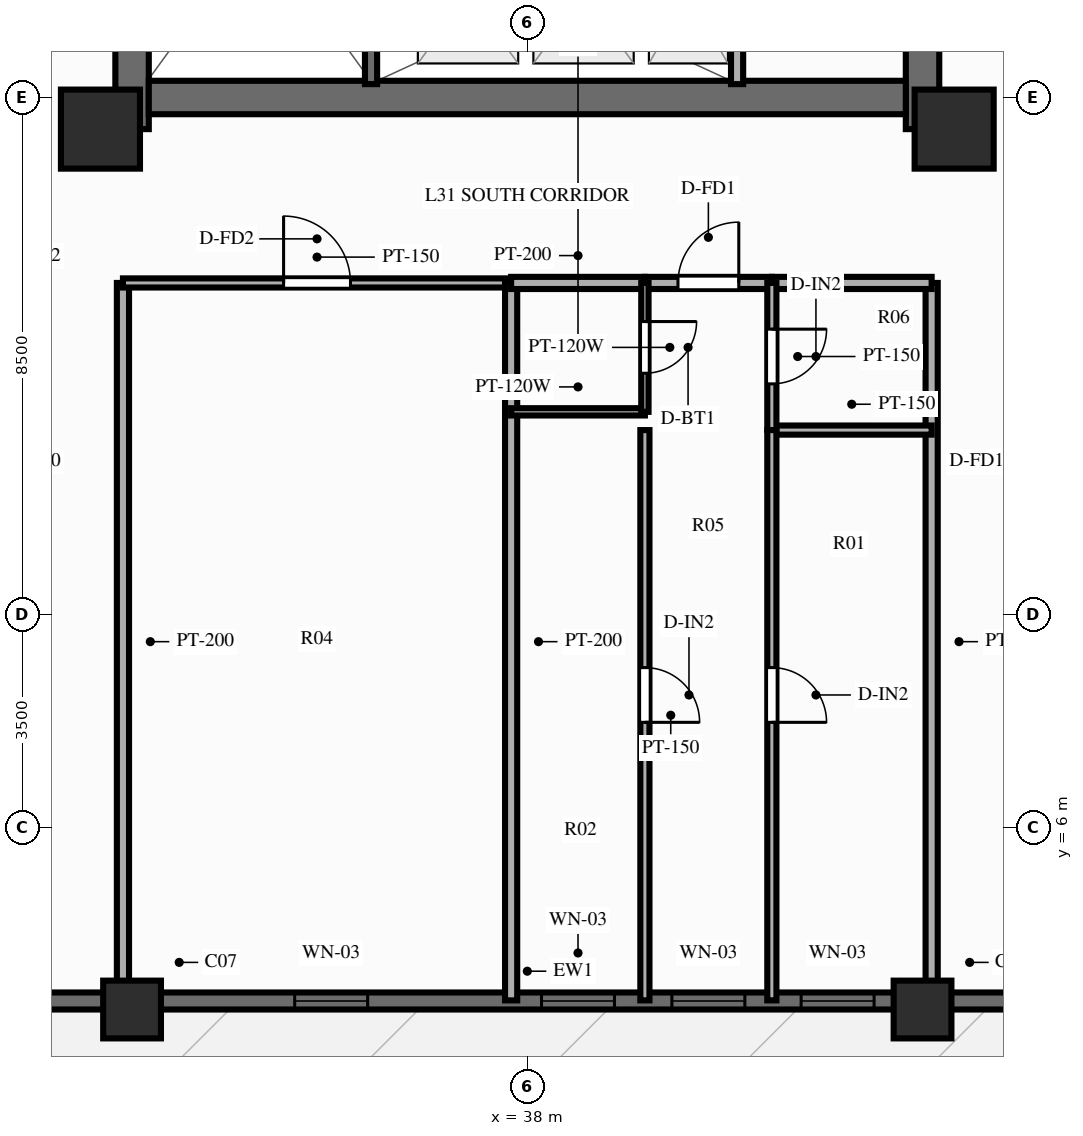
"""IFC4 building model, lengths in metres.
Left out: names, types, materials, properties, quantities, classifications, styles, units other than length and angle.
Written with IfcOpenShell. Run it as: python <this file> out.ifc"""

import sys

from ifc_helpers import new_model, si_unit, direction, frame, frame_2d, origin, origin_2d, place, context, subcontext, project, spatial, rectangle, extrude, source, transform, mapped, element, fill, save


model = new_model("IFC4")
c1 = context("Model", 3, precision=1e-05, world=origin(), true_north=direction((0.0, 1.0)))
c2 = subcontext(c1, "Body", "Model", "MODEL_VIEW")
j1 = project(units=[si_unit("LENGTHUNIT", "METRE"), si_unit("PLANEANGLEUNIT", "RADIAN")], contexts=[c1])
p1 = place(None, origin())
s1 = spatial("IfcSite", under=j1, at=p1, CompositionType="ELEMENT")
p2 = place(p1, origin())
s2 = spatial("IfcBuilding", under=s1, at=p2, CompositionType="ELEMENT")
p3 = place(p2, frame((0.0, 0.0, 98.85)))
s3 = spatial("IfcBuildingStorey", under=s2, at=p3, CompositionType="ELEMENT", Elevation=98.85)
p4 = place(p3, frame((31.5, 17.48, 0.0), z_axis=(0.0, 0.0, 1.0), x_axis=(0.0, 1.0, 0.0)))
e1 = element("IfcWall", 1, at=p4, inside=s3, PredefinedType="SHEAR", context=c2, shape_type="SweptSolid", body=[
    extrude(rectangle(XDim=19.04, YDim=0.55, at=frame_2d((9.52, 0.0))), origin(), (0.0, 0.0, 1.0), 3.0),
])
p5 = place(p4, frame((6.32, 0.0, 0.0)))
e2 = element("IfcOpeningElement", 2, at=p5, cuts=e1, PredefinedType="OPENING", context=c2, shape_type="SweptSolid", body=[
    extrude(rectangle(XDim=1.1, YDim=2.15, at=frame_2d((0.55, 1.075))), frame((0.0, 0.287, 0.0), z_axis=(0.0, -1.0, 0.0), x_axis=(1.0, 0.0, 0.0)), (0.0, 0.0, 1.0), 0.574),
])
p6 = place(p3, frame((44.5, 17.48, 0.0), z_axis=(0.0, 0.0, 1.0), x_axis=(0.0, 1.0, 0.0)))
e3 = element("IfcWall", 3, at=p6, inside=s3, PredefinedType="SHEAR", context=c2, shape_type="SweptSolid", body=[
    extrude(rectangle(XDim=19.04, YDim=0.55, at=frame_2d((9.52, 0.0))), origin(), (0.0, 0.0, 1.0), 3.0),
])
p7 = place(p6, frame((12.67, 0.0, 0.0), z_axis=(0.0, 0.0, 1.0), x_axis=(-1.0, 0.0, 0.0)))
e4 = element("IfcOpeningElement", 4, at=p7, cuts=e3, PredefinedType="OPENING", context=c2, shape_type="SweptSolid", body=[
    extrude(rectangle(XDim=1.1, YDim=2.15, at=frame_2d((0.55, 1.075))), frame((0.0, 0.287, 0.0), z_axis=(0.0, -1.0, 0.0), x_axis=(1.0, 0.0, 0.0)), (0.0, 0.0, 1.0), 0.574),
])
p8 = place(p3, frame((31.775, 18.0, 0.0), z_axis=(0.0, 0.0, 1.0), x_axis=(1.0, 0.0, 0.0)))
e5 = element("IfcWall", 5, at=p8, inside=s3, PredefinedType="SHEAR", context=c2, shape_type="SweptSolid", body=[
    extrude(rectangle(XDim=12.45, YDim=0.55, at=frame_2d((6.225, 0.0))), origin(), (0.0, 0.0, 1.0), 3.0),
])
m1 = source(origin(), c2, "Body", "SweptSolid", [
    extrude(rectangle(XDim=1.3, YDim=1.3, at=origin_2d()), origin(), (0.0, 0.0, 1.0), 3.0),
])
for number, where, z_axis, x_axis in (
    (6, (30.98, 17.48, 0.0), (0.0, 0.0, 1.0), (1.0, 0.0, 0.0)),
    (7, (45.02, 17.48, 0.0), (0.0, 0.0, 1.0), (1.0, 0.0, 0.0)),
):
    element("IfcColumn", number, at=place(p3, frame(where, z_axis=z_axis, x_axis=x_axis)), inside=s3, PredefinedType="COLUMN", context=c2, shape_type="MappedRepresentation", body=[
        mapped(m1, transform((0.0, 0.0, 0.0), scale=1.0)),
    ])
m2 = source(origin(), c2, "Body", "SweptSolid", [
    extrude(rectangle(XDim=0.95, YDim=0.95, at=origin_2d()), origin(), (0.0, 0.0, 1.0), 3.0),
])
for number, where, z_axis, x_axis in (
    (8, (31.5, 3.0, 0.0), (0.0, 0.0, 1.0), (1.0, 0.0, 0.0)),
    (9, (44.5, 3.0, 0.0), (0.0, 0.0, 1.0), (1.0, 0.0, 0.0)),
):
    element("IfcColumn", number, at=place(p3, frame(where, z_axis=z_axis, x_axis=x_axis)), inside=s3, PredefinedType="COLUMN", context=c2, shape_type="MappedRepresentation", body=[
        mapped(m2, transform((0.0, 0.0, 0.0), scale=1.0)),
    ])
p9 = place(p3, frame((16.2, 3.14, 0.0), z_axis=(0.0, 0.0, 1.0), x_axis=(1.0, 0.0, 0.0)))
e10 = element("IfcWall", 10, at=p9, inside=s3, PredefinedType="SOLIDWALL", context=c2, shape_type="SweptSolid", body=[
    extrude(rectangle(XDim=43.6, YDim=0.28, at=frame_2d((21.8, 0.0))), origin(), (0.0, 0.0, 1.0), 2.28),
])
p10 = place(p9, frame((8.2, 0.0, 0.0), z_axis=(0.0, 0.0, 1.0), x_axis=(-1.0, 0.0, 0.0)))
e11 = element("IfcOpeningElement", 11, at=p10, cuts=e10, PredefinedType="OPENING", context=c2, shape_type="SweptSolid", body=[
    extrude(rectangle(XDim=1.1, YDim=2.15, at=frame_2d((0.55, 1.075))), frame((0.0, 0.152, 0.0), z_axis=(0.0, -1.0, 0.0), x_axis=(1.0, 0.0, 0.0)), (0.0, 0.0, 1.0), 0.304),
])
p11 = place(p9, frame((17.975, 0.0, 0.25)))
e12 = element("IfcOpeningElement", 12, at=p11, cuts=e10, PredefinedType="OPENING", context=c2, shape_type="SweptSolid", body=[
    extrude(rectangle(XDim=1.2, YDim=1.5, at=frame_2d((0.6, 0.75))), frame((0.0, 0.152, 0.0), z_axis=(0.0, -1.0, 0.0), x_axis=(1.0, 0.0, 0.0)), (0.0, 0.0, 1.0), 0.304),
])
p12 = place(p9, frame((22.034, 0.0, 0.25)))
e13 = element("IfcOpeningElement", 13, at=p12, cuts=e10, PredefinedType="OPENING", context=c2, shape_type="SweptSolid", body=[
    extrude(rectangle(XDim=1.2, YDim=1.5, at=frame_2d((0.6, 0.75))), frame((0.0, 0.152, 0.0), z_axis=(0.0, -1.0, 0.0), x_axis=(1.0, 0.0, 0.0)), (0.0, 0.0, 1.0), 0.304),
])
p13 = place(p9, frame((24.178, 0.0, 0.25)))
e14 = element("IfcOpeningElement", 14, at=p13, cuts=e10, PredefinedType="OPENING", context=c2, shape_type="SweptSolid", body=[
    extrude(rectangle(XDim=1.2, YDim=1.5, at=frame_2d((0.6, 0.75))), frame((0.0, 0.152, 0.0), z_axis=(0.0, -1.0, 0.0), x_axis=(1.0, 0.0, 0.0)), (0.0, 0.0, 1.0), 0.304),
])
p14 = place(p9, frame((26.303, 0.0, 0.25)))
e15 = element("IfcOpeningElement", 15, at=p14, cuts=e10, PredefinedType="OPENING", context=c2, shape_type="SweptSolid", body=[
    extrude(rectangle(XDim=1.2, YDim=1.5, at=frame_2d((0.6, 0.75))), frame((0.0, 0.152, 0.0), z_axis=(0.0, -1.0, 0.0), x_axis=(1.0, 0.0, 0.0)), (0.0, 0.0, 1.0), 0.304),
])
p15 = place(p9, frame((35.35, 0.0, 0.25)))
e16 = element("IfcOpeningElement", 16, at=p15, cuts=e10, PredefinedType="OPENING", context=c2, shape_type="SweptSolid", body=[
    extrude(rectangle(XDim=1.2, YDim=1.5, at=frame_2d((0.6, 0.75))), frame((0.0, 0.152, 0.0), z_axis=(0.0, -1.0, 0.0), x_axis=(1.0, 0.0, 0.0)), (0.0, 0.0, 1.0), 0.304),
])
p16 = place(p3, frame((41.45, 18.22, 0.0), z_axis=(0.0, 0.0, 1.0), x_axis=(0.0, 1.0, 0.0)))
e17 = element("IfcWall", 17, at=p16, inside=s3, PredefinedType="PARTITIONING", context=c2, shape_type="SweptSolid", body=[
    extrude(rectangle(XDim=2.96, YDim=0.2, at=frame_2d((1.48, 0.0))), origin(), (0.0, 0.0, 1.0), 2.79),
])
p17 = place(p3, frame((35.43, 18.22, 0.0), z_axis=(0.0, 0.0, 1.0), x_axis=(0.0, 1.0, 0.0)))
e18 = element("IfcWall", 18, at=p17, inside=s3, PredefinedType="SOLIDWALL", context=c2, shape_type="SweptSolid", body=[
    extrude(rectangle(XDim=7.22, YDim=0.2, at=frame_2d((3.61, 0.0))), origin(), (0.0, 0.0, 1.0), 2.79),
])
p18 = place(p17, frame((6.68, 0.0, 0.0), z_axis=(0.0, 0.0, 1.0), x_axis=(-1.0, 0.0, 0.0)))
e19 = element("IfcOpeningElement", 19, at=p18, cuts=e18, PredefinedType="OPENING", context=c2, shape_type="SweptSolid", body=[
    extrude(rectangle(XDim=1.1, YDim=2.15, at=frame_2d((0.55, 1.075))), frame((0.0, 0.112, 0.0), z_axis=(0.0, -1.0, 0.0), x_axis=(1.0, 0.0, 0.0)), (0.0, 0.0, 1.0), 0.224),
])
for number, where, z_axis, x_axis in (
    (20, (31.35, 14.95, 0.0), (0.0, 0.0, 1.0), (0.0, -1.0, 0.0)),
    (21, (44.65, 14.95, 0.0), (0.0, 0.0, 1.0), (0.0, -1.0, 0.0)),
):
    element("IfcWall", number, at=place(p3, frame(where, z_axis=z_axis, x_axis=x_axis)), inside=s3, PredefinedType="PARTITIONING", context=c2, shape_type="SweptSolid", body=[
        extrude(rectangle(XDim=11.8, YDim=0.2, at=frame_2d((5.9, 0.0))), origin(), (0.0, 0.0, 1.0), 2.34),
    ])
p19 = place(p3, frame((31.35, 14.95, 0.0), z_axis=(0.0, 0.0, 1.0), x_axis=(1.0, 0.0, 0.0)))
e22 = element("IfcWall", 22, at=p19, inside=s3, PredefinedType="PARTITIONING", context=c2, shape_type="SweptSolid", body=[
    extrude(rectangle(XDim=6.384, YDim=0.15, at=frame_2d((3.192, 0.0))), origin(), (0.0, 0.0, 1.0), 2.79),
])
p20 = place(p19, frame((2.642, 0.0, 0.0)))
e23 = element("IfcOpeningElement", 23, at=p20, cuts=e22, PredefinedType="OPENING", context=c2, shape_type="SweptSolid", body=[
    extrude(rectangle(XDim=1.1, YDim=2.15, at=frame_2d((0.55, 1.075))), frame((0.0, 0.087, 0.0), z_axis=(0.0, -1.0, 0.0), x_axis=(1.0, 0.0, 0.0)), (0.0, 0.0, 1.0), 0.174),
])
p21 = place(p3, frame((37.734, 14.95, 0.0), z_axis=(0.0, 0.0, 1.0), x_axis=(0.0, -1.0, 0.0)))
e24 = element("IfcWall", 24, at=p21, inside=s3, PredefinedType="PARTITIONING", context=c2, shape_type="SweptSolid", body=[
    extrude(rectangle(XDim=11.8, YDim=0.2, at=frame_2d((5.9, 0.0))), origin(), (0.0, 0.0, 1.0), 2.79),
])
p22 = place(p3, frame((37.734, 14.95, 0.0), z_axis=(0.0, 0.0, 1.0), x_axis=(1.0, 0.0, 0.0)))
e25 = element("IfcWall", 25, at=p22, inside=s3, PredefinedType="PARTITIONING", context=c2, shape_type="SweptSolid", body=[
    extrude(rectangle(XDim=2.2, YDim=0.2, at=frame_2d((1.1, 0.0))), origin(), (0.0, 0.0, 1.0), 2.79),
])
p23 = place(p3, frame((39.934, 14.95, 0.0), z_axis=(0.0, 0.0, 1.0), x_axis=(1.0, 0.0, 0.0)))
e26 = element("IfcWall", 26, at=p23, inside=s3, PredefinedType="PARTITIONING", context=c2, shape_type="SweptSolid", body=[
    extrude(rectangle(XDim=2.088, YDim=0.2, at=frame_2d((1.044, 0.0))), origin(), (0.0, 0.0, 1.0), 2.79),
])
p24 = place(p23, frame((0.544, 0.0, 0.0)))
e27 = element("IfcOpeningElement", 27, at=p24, cuts=e26, PredefinedType="OPENING", context=c2, shape_type="SweptSolid", body=[
    extrude(rectangle(XDim=1.0, YDim=2.15, at=frame_2d((0.5, 1.075))), frame((0.0, 0.112, 0.0), z_axis=(0.0, -1.0, 0.0), x_axis=(1.0, 0.0, 0.0)), (0.0, 0.0, 1.0), 0.224),
])
p25 = place(p3, frame((42.022, 14.95, 0.0), z_axis=(0.0, 0.0, 1.0), x_axis=(1.0, 0.0, 0.0)))
e28 = element("IfcWall", 28, at=p25, inside=s3, PredefinedType="PARTITIONING", context=c2, shape_type="SweptSolid", body=[
    extrude(rectangle(XDim=2.628, YDim=0.2, at=frame_2d((1.314, 0.0))), origin(), (0.0, 0.0, 1.0), 2.79),
])
p26 = place(p3, frame((37.734, 12.83, 0.0), z_axis=(0.0, 0.0, 1.0), x_axis=(1.0, 0.0, 0.0)))
e29 = element("IfcWall", 29, at=p26, inside=s3, PredefinedType="PARTITIONING", context=c2, shape_type="SweptSolid", body=[
    extrude(rectangle(XDim=2.2, YDim=0.12, at=frame_2d((1.1, 0.0))), origin(), (0.0, 0.0, 1.0), 2.79),
])
p27 = place(p3, frame((42.022, 12.53, 0.0), z_axis=(0.0, 0.0, 1.0), x_axis=(1.0, 0.0, 0.0)))
e30 = element("IfcWall", 30, at=p27, inside=s3, PredefinedType="PARTITIONING", context=c2, shape_type="SweptSolid", body=[
    extrude(rectangle(XDim=2.628, YDim=0.15, at=frame_2d((1.314, 0.0))), origin(), (0.0, 0.0, 1.0), 2.79),
])
p28 = place(p3, frame((39.934, 14.95, 0.0), z_axis=(0.0, 0.0, 1.0), x_axis=(0.0, -1.0, 0.0)))
e31 = element("IfcWall", 31, at=p28, inside=s3, PredefinedType="PARTITIONING", context=c2, shape_type="SweptSolid", body=[
    extrude(rectangle(XDim=2.12, YDim=0.12, at=frame_2d((1.06, 0.0))), origin(), (0.0, 0.0, 1.0), 2.79),
])
p29 = place(p28, frame((0.635, 0.0, 0.0)))
e32 = element("IfcOpeningElement", 32, at=p29, cuts=e31, PredefinedType="OPENING", context=c2, shape_type="SweptSolid", body=[
    extrude(rectangle(XDim=0.85, YDim=2.05, at=frame_2d((0.425, 1.025))), frame((0.0, 0.072, 0.0), z_axis=(0.0, -1.0, 0.0), x_axis=(1.0, 0.0, 0.0)), (0.0, 0.0, 1.0), 0.144),
])
p30 = place(p3, frame((39.934, 12.53, 0.0), z_axis=(0.0, 0.0, 1.0), x_axis=(0.0, -1.0, 0.0)))
e33 = element("IfcWall", 33, at=p30, inside=s3, PredefinedType="PARTITIONING", context=c2, shape_type="SweptSolid", body=[
    extrude(rectangle(XDim=9.38, YDim=0.15, at=frame_2d((4.69, 0.0))), origin(), (0.0, 0.0, 1.0), 2.79),
])
p31 = place(p30, frame((3.907, 0.0, 0.0)))
e34 = element("IfcOpeningElement", 34, at=p31, cuts=e33, PredefinedType="OPENING", context=c2, shape_type="SweptSolid", body=[
    extrude(rectangle(XDim=0.9, YDim=2.1, at=frame_2d((0.45, 1.05))), frame((0.0, 0.087, 0.0), z_axis=(0.0, -1.0, 0.0), x_axis=(1.0, 0.0, 0.0)), (0.0, 0.0, 1.0), 0.174),
])
p32 = place(p3, frame((42.022, 14.95, 0.0), z_axis=(0.0, 0.0, 1.0), x_axis=(0.0, -1.0, 0.0)))
e35 = element("IfcWall", 35, at=p32, inside=s3, PredefinedType="PARTITIONING", context=c2, shape_type="SweptSolid", body=[
    extrude(rectangle(XDim=2.42, YDim=0.15, at=frame_2d((1.21, 0.0))), origin(), (0.0, 0.0, 1.0), 2.79),
])
p33 = place(p32, frame((0.76, 0.0, 0.0)))
e36 = element("IfcOpeningElement", 36, at=p33, cuts=e35, PredefinedType="OPENING", context=c2, shape_type="SweptSolid", body=[
    extrude(rectangle(XDim=0.9, YDim=2.1, at=frame_2d((0.45, 1.05))), frame((0.0, 0.087, 0.0), z_axis=(0.0, -1.0, 0.0), x_axis=(1.0, 0.0, 0.0)), (0.0, 0.0, 1.0), 0.174),
])
p34 = place(p3, frame((42.022, 12.53, 0.0), z_axis=(0.0, 0.0, 1.0), x_axis=(0.0, -1.0, 0.0)))
e37 = element("IfcWall", 37, at=p34, inside=s3, PredefinedType="PARTITIONING", context=c2, shape_type="SweptSolid", body=[
    extrude(rectangle(XDim=9.38, YDim=0.15, at=frame_2d((4.69, 0.0))), origin(), (0.0, 0.0, 1.0), 2.79),
])
p35 = place(p34, frame((3.907, 0.0, 0.0)))
e38 = element("IfcOpeningElement", 38, at=p35, cuts=e37, PredefinedType="OPENING", context=c2, shape_type="SweptSolid", body=[
    extrude(rectangle(XDim=0.9, YDim=2.1, at=frame_2d((0.45, 1.05))), frame((0.0, 0.087, 0.0), z_axis=(0.0, -1.0, 0.0), x_axis=(1.0, 0.0, 0.0)), (0.0, 0.0, 1.0), 0.174),
])
m3 = source(origin(), c2, "Body", "SweptSolid", [
    extrude(rectangle(XDim=1.2, YDim=1.5, at=frame_2d((0.6, 0.75))), frame((0.0, 0.03, 0.0), z_axis=(0.0, -1.0, 0.0), x_axis=(1.0, 0.0, 0.0)), (0.0, 0.0, 1.0), 0.06),
])
p36 = place(p11, origin())
e39 = element("IfcWindow", 39, at=p36, inside=s3, PartitioningType="SINGLE_PANEL", PredefinedType="WINDOW", context=c2, shape_type="MappedRepresentation", body=[
    mapped(m3, transform((0.0, 0.0, 0.0), scale=1.0)),
])
fill(e12, e39)
p37 = place(p12, origin())
e40 = element("IfcWindow", 40, at=p37, inside=s3, PartitioningType="SINGLE_PANEL", PredefinedType="WINDOW", context=c2, shape_type="MappedRepresentation", body=[
    mapped(m3, transform((0.0, 0.0, 0.0), scale=1.0)),
])
fill(e13, e40)
p38 = place(p13, origin())
e41 = element("IfcWindow", 41, at=p38, inside=s3, PartitioningType="SINGLE_PANEL", PredefinedType="WINDOW", context=c2, shape_type="MappedRepresentation", body=[
    mapped(m3, transform((0.0, 0.0, 0.0), scale=1.0)),
])
fill(e14, e41)
p39 = place(p14, origin())
e42 = element("IfcWindow", 42, at=p39, inside=s3, PartitioningType="SINGLE_PANEL", PredefinedType="WINDOW", context=c2, shape_type="MappedRepresentation", body=[
    mapped(m3, transform((0.0, 0.0, 0.0), scale=1.0)),
])
fill(e15, e42)
m4 = source(origin(), c2, "Body", "SweptSolid", [
    extrude(rectangle(XDim=1.1, YDim=2.15, at=frame_2d((0.55, 1.075))), frame((0.0, 0.025, 0.0), z_axis=(0.0, -1.0, 0.0), x_axis=(1.0, 0.0, 0.0)), (0.0, 0.0, 1.0), 0.05),
])
p40 = place(p20, origin())
e43 = element("IfcDoor", 43, at=p40, inside=s3, OperationType="SINGLE_SWING_LEFT", PredefinedType="DOOR", context=c2, shape_type="MappedRepresentation", body=[
    mapped(m4, transform((0.0, 0.0, 0.0), scale=1.0)),
])
fill(e23, e43)
m5 = source(origin(), c2, "Body", "SweptSolid", [
    extrude(rectangle(XDim=1.0, YDim=2.15, at=frame_2d((0.5, 1.075))), frame((0.0, 0.025, 0.0), z_axis=(0.0, -1.0, 0.0), x_axis=(1.0, 0.0, 0.0)), (0.0, 0.0, 1.0), 0.05),
])
p41 = place(p24, origin())
e44 = element("IfcDoor", 44, at=p41, inside=s3, OperationType="SINGLE_SWING_RIGHT", PredefinedType="DOOR", context=c2, shape_type="MappedRepresentation", body=[
    mapped(m5, transform((0.0, 0.0, 0.0), scale=1.0)),
])
fill(e27, e44)
m6 = source(origin(), c2, "Body", "SweptSolid", [
    extrude(rectangle(XDim=0.85, YDim=2.05, at=frame_2d((0.425, 1.025))), frame((0.0, 0.025, 0.0), z_axis=(0.0, -1.0, 0.0), x_axis=(1.0, 0.0, 0.0)), (0.0, 0.0, 1.0), 0.05),
])
p42 = place(p29, origin())
e45 = element("IfcDoor", 45, at=p42, inside=s3, OperationType="SINGLE_SWING_LEFT", PredefinedType="DOOR", context=c2, shape_type="MappedRepresentation", body=[
    mapped(m6, transform((0.0, 0.0, 0.0), scale=1.0)),
])
fill(e32, e45)
m7 = source(origin(), c2, "Body", "SweptSolid", [
    extrude(rectangle(XDim=0.9, YDim=2.1, at=frame_2d((0.45, 1.05))), frame((0.0, 0.025, 0.0), z_axis=(0.0, -1.0, 0.0), x_axis=(1.0, 0.0, 0.0)), (0.0, 0.0, 1.0), 0.05),
])
p43 = place(p31, origin())
e46 = element("IfcDoor", 46, at=p43, inside=s3, OperationType="SINGLE_SWING_RIGHT", PredefinedType="DOOR", context=c2, shape_type="MappedRepresentation", body=[
    mapped(m7, transform((0.0, 0.0, 0.0), scale=1.0)),
])
fill(e34, e46)
p44 = place(p33, origin())
e47 = element("IfcDoor", 47, at=p44, inside=s3, OperationType="SINGLE_SWING_LEFT", PredefinedType="DOOR", context=c2, shape_type="MappedRepresentation", body=[
    mapped(m7, transform((0.0, 0.0, 0.0), scale=1.0)),
])
fill(e36, e47)
p45 = place(p35, origin())
e48 = element("IfcDoor", 48, at=p45, inside=s3, OperationType="SINGLE_SWING_RIGHT", PredefinedType="DOOR", context=c2, shape_type="MappedRepresentation", body=[
    mapped(m7, transform((0.0, 0.0, 0.0), scale=1.0)),
])
fill(e38, e48)
save(model, sys.argv[1])
